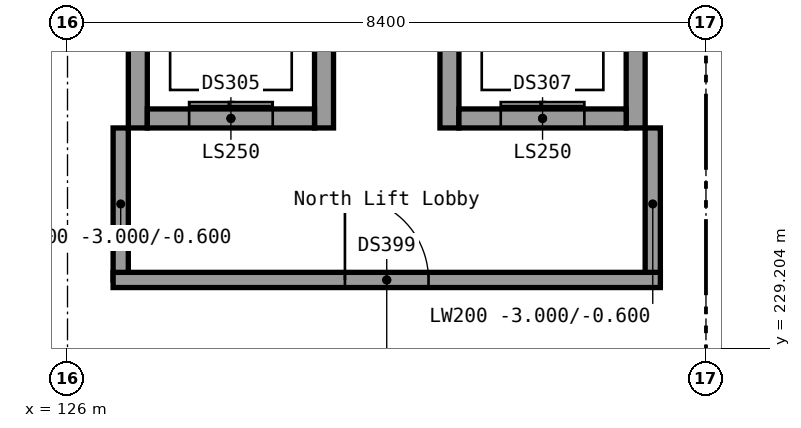
"""IFC4 building model, lengths in metres.
Left out: names, types, materials, properties, quantities, classifications, styles, units other than length and angle.
Written with IfcOpenShell. Run it as: python <this file> out.ifc"""

import sys

from ifc_helpers import new_model, si_unit, direction, frame, frame_2d, origin, place, context, subcontext, project, spatial, rectangle, extrude, element, fill, save


model = new_model("IFC4")
c1 = context("Model", 3, precision=1e-05, world=origin(), true_north=direction((0.0, 1.0)))
c2 = subcontext(c1, "Body", "Model", "MODEL_VIEW")
j1 = project(units=[si_unit("LENGTHUNIT", "METRE"), si_unit("PLANEANGLEUNIT", "RADIAN")], contexts=[c1])
p1 = place(None, origin())
s1 = spatial("IfcSite", under=j1, at=p1, CompositionType="ELEMENT")
p2 = place(p1, origin())
s2 = spatial("IfcBuilding", under=s1, at=p2, CompositionType="ELEMENT")
p3 = place(p2, frame((0.0, 0.0, -3.0)))
s3 = spatial("IfcBuildingStorey", under=s2, at=p3, CompositionType="ELEMENT", Elevation=-3.0)
for number, where, z_axis, x_axis in (
    (1, (126.925, 232.1, -1.5), (0.0, 0.0, 1.0), (0.0, 1.0, 0.0)),
    (2, (129.375, 232.1, -1.5), (0.0, 0.0, 1.0), (0.0, 1.0, 0.0)),
):
    element("IfcWall", number, at=place(p3, frame(where, z_axis=z_axis, x_axis=x_axis)), inside=s3, PredefinedType="SHEAR", context=c2, shape_type="SweptSolid", body=[
        extrude(rectangle(XDim=3.1, YDim=0.25, at=frame_2d((1.55, 0.0))), origin(), (0.0, 0.0, 1.0), 4.5),
    ])
p4 = place(p3, frame((127.05, 232.225, -1.5), z_axis=(0.0, 0.0, 1.0), x_axis=(1.0, 0.0, 0.0)))
e3 = element("IfcWall", 3, at=p4, inside=s3, PredefinedType="SHEAR", context=c2, shape_type="SweptSolid", body=[
    extrude(rectangle(XDim=2.2, YDim=0.25, at=frame_2d((1.1, 0.0))), origin(), (0.0, 0.0, 1.0), 4.5),
])
p5 = place(p4, frame((0.55, 0.0, 1.5)))
e4 = element("IfcOpeningElement", 4, at=p5, cuts=e3, PredefinedType="OPENING", context=c2, shape_type="SweptSolid", body=[
    extrude(rectangle(XDim=1.1, YDim=2.1, at=frame_2d((0.55, 1.05))), frame((0.0, 0.125, 0.0), z_axis=(0.0, -1.0, 0.0), x_axis=(1.0, 0.0, 0.0)), (0.0, 0.0, 1.0), 0.25),
])
for number, where, z_axis, x_axis in (
    (5, (131.025, 232.1, -1.5), (0.0, 0.0, 1.0), (0.0, 1.0, 0.0)),
    (6, (133.475, 232.1, -1.5), (0.0, 0.0, 1.0), (0.0, 1.0, 0.0)),
):
    element("IfcWall", number, at=place(p3, frame(where, z_axis=z_axis, x_axis=x_axis)), inside=s3, PredefinedType="SHEAR", context=c2, shape_type="SweptSolid", body=[
        extrude(rectangle(XDim=3.1, YDim=0.25, at=frame_2d((1.55, 0.0))), origin(), (0.0, 0.0, 1.0), 4.5),
    ])
p6 = place(p3, frame((131.15, 232.225, -1.5), z_axis=(0.0, 0.0, 1.0), x_axis=(1.0, 0.0, 0.0)))
e7 = element("IfcWall", 7, at=p6, inside=s3, PredefinedType="SHEAR", context=c2, shape_type="SweptSolid", body=[
    extrude(rectangle(XDim=2.2, YDim=0.25, at=frame_2d((1.1, 0.0))), origin(), (0.0, 0.0, 1.0), 4.5),
])
p7 = place(p6, frame((0.55, 0.0, 1.5)))
e8 = element("IfcOpeningElement", 8, at=p7, cuts=e7, PredefinedType="OPENING", context=c2, shape_type="SweptSolid", body=[
    extrude(rectangle(XDim=1.1, YDim=2.1, at=frame_2d((0.55, 1.05))), frame((0.0, 0.125, 0.0), z_axis=(0.0, -1.0, 0.0), x_axis=(1.0, 0.0, 0.0)), (0.0, 0.0, 1.0), 0.25),
])
for number, where, z_axis, x_axis in (
    (9, (126.7, 230.1, 0.0), (0.0, 0.0, 1.0), (0.0, 1.0, 0.0)),
    (10, (133.7, 230.1, 0.0), (0.0, 0.0, 1.0), (0.0, 1.0, 0.0)),
):
    element("IfcWall", number, at=place(p3, frame(where, z_axis=z_axis, x_axis=x_axis)), inside=s3, PredefinedType="PARTITIONING", context=c2, shape_type="SweptSolid", body=[
        extrude(rectangle(XDim=2.0, YDim=0.2, at=frame_2d((1.0, 0.0))), origin(), (0.0, 0.0, 1.0), 2.4),
    ])
p8 = place(p3, frame((126.6, 230.1, 0.0), z_axis=(0.0, 0.0, 1.0), x_axis=(1.0, 0.0, 0.0)))
e11 = element("IfcWall", 11, at=p8, inside=s3, PredefinedType="PARTITIONING", context=c2, shape_type="SweptSolid", body=[
    extrude(rectangle(XDim=7.2, YDim=0.2, at=frame_2d((3.6, 0.0))), origin(), (0.0, 0.0, 1.0), 2.4),
])
p9 = place(p8, frame((3.05, 0.0, 0.0)))
e12 = element("IfcOpeningElement", 12, at=p9, cuts=e11, PredefinedType="OPENING", context=c2, shape_type="SweptSolid", body=[
    extrude(rectangle(XDim=1.1, YDim=2.1, at=frame_2d((0.55, 1.05))), frame((0.0, 0.1, 0.0), z_axis=(0.0, -1.0, 0.0), x_axis=(1.0, 0.0, 0.0)), (0.0, 0.0, 1.0), 0.2),
])
p10 = place(p5, origin())
e13 = element("IfcDoor", 13, at=p10, inside=s3, OperationType="DOUBLE_DOOR_SLIDING", PredefinedType="DOOR", context=c2, shape_type="SweptSolid", body=[
    extrude(rectangle(XDim=1.1, YDim=2.1, at=frame_2d((0.55, 1.05))), frame((0.0, 0.025, 0.0), z_axis=(0.0, -1.0, 0.0), x_axis=(1.0, 0.0, 0.0)), (0.0, 0.0, 1.0), 0.05),
])
fill(e4, e13)
p11 = place(p7, origin())
e14 = element("IfcDoor", 14, at=p11, inside=s3, OperationType="DOUBLE_DOOR_SLIDING", PredefinedType="DOOR", context=c2, shape_type="SweptSolid", body=[
    extrude(rectangle(XDim=1.1, YDim=2.1, at=frame_2d((0.55, 1.05))), frame((0.0, 0.025, 0.0), z_axis=(0.0, -1.0, 0.0), x_axis=(1.0, 0.0, 0.0)), (0.0, 0.0, 1.0), 0.05),
])
fill(e8, e14)
p12 = place(p9, origin())
e15 = element("IfcDoor", 15, at=p12, inside=s3, OperationType="SINGLE_SWING_LEFT", PredefinedType="DOOR", context=c2, shape_type="SweptSolid", body=[
    extrude(rectangle(XDim=1.1, YDim=2.1, at=frame_2d((0.55, 1.05))), frame((0.0, 0.025, 0.0), z_axis=(0.0, -1.0, 0.0), x_axis=(1.0, 0.0, 0.0)), (0.0, 0.0, 1.0), 0.05),
])
fill(e12, e15)
save(model, sys.argv[1])
